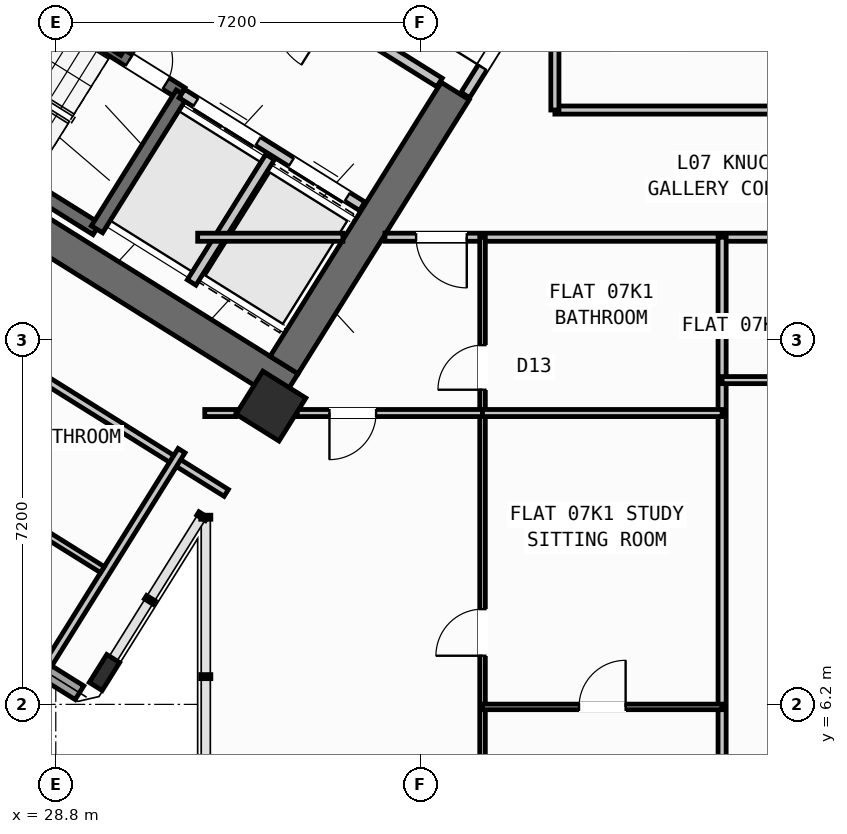
"""IFC4 building model, lengths in metres.
Left out: names, types, materials, properties, quantities, classifications, styles, units other than length and angle.
Written with IfcOpenShell. Run it as: python <this file> out.ifc"""

import sys

from ifc_helpers import new_model, si_unit, direction, frame, frame_2d, origin, origin_2d, place, context, subcontext, project, spatial, rectangle, hollow_rectangle, i_section, extrude, source, transform, mapped, element, fill, save


model = new_model("IFC4")
c1 = context("Model", 3, precision=1e-05, world=origin(), true_north=direction((0.0, 1.0)))
c2 = subcontext(c1, "Body", "Model", "MODEL_VIEW")
j1 = project(units=[si_unit("LENGTHUNIT", "METRE"), si_unit("PLANEANGLEUNIT", "RADIAN")], contexts=[c1])
p1 = place(None, origin())
s1 = spatial("IfcSite", under=j1, at=p1, CompositionType="ELEMENT")
p2 = place(p1, origin())
s2 = spatial("IfcBuilding", under=s1, at=p2, CompositionType="ELEMENT")
p3 = place(p2, frame((0.0, 0.0, 31.2)))
s3 = spatial("IfcBuildingStorey", under=s2, at=p3, CompositionType="ELEMENT", Elevation=31.2)
p4 = place(p3, frame((33.409, 12.45, 0.0), z_axis=(0.0, 0.0, 1.0), x_axis=(-0.848051132073, 0.529914405721, 0.0)))
e1 = element("IfcWall", 1, at=p4, inside=s3, PredefinedType="SHEAR", context=c2, shape_type="SweptSolid", body=[
    extrude(rectangle(XDim=13.24, YDim=0.65, at=frame_2d((6.62, 0.0))), origin(), (0.0, 0.0, 1.0), 3.35),
])
p5 = place(p3, frame((36.683, 18.304, 0.0), z_axis=(0.0, 0.0, 1.0), x_axis=(-0.529899109053, -0.848060690178, 0.0)))
e2 = element("IfcWall", 2, at=p5, inside=s3, PredefinedType="SHEAR", context=c2, shape_type="SweptSolid", body=[
    extrude(rectangle(XDim=6.375, YDim=0.65, at=frame_2d((3.188, 0.0))), origin(), (0.0, 0.0, 1.0), 3.35),
])
m1 = source(origin(), c2, "Body", "SweptSolid", [
    extrude(hollow_rectangle(XDim=1.0, YDim=1.0, WallThickness=0.04, at=origin_2d()), origin(), (0.0, 0.0, 1.0), 3.6),
])
p6 = place(p3, frame((33.046, 12.087, 0.0), z_axis=(0.0, 0.0, 1.0), x_axis=(-0.848048096156, 0.529919264233, 0.0)))
e3 = element("IfcColumn", 3, at=p6, inside=s3, PredefinedType="COLUMN", context=c2, shape_type="MappedRepresentation", body=[
    mapped(m1, transform((0.0, 0.0, 0.0), scale=1.0)),
])
m2 = source(origin(), c2, "Body", "SweptSolid", [
    extrude(i_section(OverallWidth=0.3, OverallDepth=0.65, WebThickness=0.016, FlangeThickness=0.031, at=origin_2d()), origin(), (0.0, 0.0, 1.0), 3.6),
])
p7 = place(p3, frame((29.761, 6.829, 0.0), z_axis=(0.0, 0.0, 1.0), x_axis=(-0.848048096156, 0.529919264233, 0.0)))
e4 = element("IfcColumn", 4, at=p7, inside=s3, PredefinedType="COLUMN", context=c2, shape_type="MappedRepresentation", body=[
    mapped(m2, transform((0.0, 0.0, 0.0), scale=1.0)),
])
p8 = place(p3, frame((29.268, 6.429, 0.0), z_axis=(0.0, 0.0, 1.0), x_axis=(-0.848049971435, 0.529916263149, 0.0)))
e5 = element("IfcWall", 5, at=p8, inside=s3, PredefinedType="STANDARD", context=c2, shape_type="SweptSolid", body=[
    extrude(rectangle(XDim=31.588, YDim=0.32, at=frame_2d((15.794, 0.0))), origin(), (0.0, 0.0, 1.0), 3.35),
])
p9 = place(p8, frame((16.362, 0.0, 0.0)))
e6 = element("IfcOpeningElement", 6, at=p9, cuts=e5, PredefinedType="OPENING", context=c2, shape_type="SweptSolid", body=[
    extrude(rectangle(XDim=1.2, YDim=2.15, at=frame_2d((0.6, 1.075))), frame((0.0, 0.17, 0.0), z_axis=(0.0, -1.0, 0.0), x_axis=(1.0, 0.0, 0.0)), (0.0, 0.0, 1.0), 0.34),
])
p10 = place(p8, frame((2.989, 0.0, 0.8)))
e7 = element("IfcOpeningElement", 7, at=p10, cuts=e5, PredefinedType="OPENING", context=c2, shape_type="SweptSolid", body=[
    extrude(rectangle(XDim=2.1, YDim=1.55, at=frame_2d((1.05, 0.775))), frame((0.0, 0.17, 0.0), z_axis=(0.0, -1.0, 0.0), x_axis=(1.0, 0.0, 0.0)), (0.0, 0.0, 1.0), 0.34),
])
p11 = place(p8, frame((8.359, 0.0, 0.8)))
e8 = element("IfcOpeningElement", 8, at=p11, cuts=e5, PredefinedType="OPENING", context=c2, shape_type="SweptSolid", body=[
    extrude(rectangle(XDim=2.1, YDim=1.55, at=frame_2d((1.05, 0.775))), frame((0.0, 0.17, 0.0), z_axis=(0.0, -1.0, 0.0), x_axis=(1.0, 0.0, 0.0)), (0.0, 0.0, 1.0), 0.34),
])
p12 = place(p8, frame((13.284, 0.0, 0.95)))
e9 = element("IfcOpeningElement", 9, at=p12, cuts=e5, PredefinedType="OPENING", context=c2, shape_type="SweptSolid", body=[
    extrude(rectangle(XDim=1.2, YDim=1.4, at=frame_2d((0.6, 0.7))), frame((0.0, 0.17, 0.0), z_axis=(0.0, -1.0, 0.0), x_axis=(1.0, 0.0, 0.0)), (0.0, 0.0, 1.0), 0.34),
])
p13 = place(p8, frame((29.188, 0.0, 0.95)))
e10 = element("IfcOpeningElement", 10, at=p13, cuts=e5, PredefinedType="OPENING", context=c2, shape_type="SweptSolid", body=[
    extrude(rectangle(XDim=1.2, YDim=1.4, at=frame_2d((0.6, 0.7))), frame((0.0, 0.17, 0.0), z_axis=(0.0, -1.0, 0.0), x_axis=(1.0, 0.0, 0.0)), (0.0, 0.0, 1.0), 0.34),
])
p14 = place(p8, frame((19.11, 0.0, 1.0)))
e11 = element("IfcOpeningElement", 11, at=p14, cuts=e5, PredefinedType="OPENING", context=c2, shape_type="SweptSolid", body=[
    extrude(rectangle(XDim=0.9, YDim=1.25, at=frame_2d((0.45, 0.625))), frame((0.0, 0.17, 0.0), z_axis=(0.0, -1.0, 0.0), x_axis=(1.0, 0.0, 0.0)), (0.0, 0.0, 1.0), 0.34),
])
p15 = place(p8, frame((21.226, 0.0, 1.0)))
e12 = element("IfcOpeningElement", 12, at=p15, cuts=e5, PredefinedType="OPENING", context=c2, shape_type="SweptSolid", body=[
    extrude(rectangle(XDim=0.9, YDim=1.25, at=frame_2d((0.45, 0.625))), frame((0.0, 0.17, 0.0), z_axis=(0.0, -1.0, 0.0), x_axis=(1.0, 0.0, 0.0)), (0.0, 0.0, 1.0), 0.34),
])
p16 = place(p8, frame((23.014, 0.0, 1.0)))
e13 = element("IfcOpeningElement", 13, at=p16, cuts=e5, PredefinedType="OPENING", context=c2, shape_type="SweptSolid", body=[
    extrude(rectangle(XDim=0.9, YDim=1.25, at=frame_2d((0.45, 0.625))), frame((0.0, 0.17, 0.0), z_axis=(0.0, -1.0, 0.0), x_axis=(1.0, 0.0, 0.0)), (0.0, 0.0, 1.0), 0.34),
])
p17 = place(p8, frame((24.802, 0.0, 1.0)))
e14 = element("IfcOpeningElement", 14, at=p17, cuts=e5, PredefinedType="OPENING", context=c2, shape_type="SweptSolid", body=[
    extrude(rectangle(XDim=0.9, YDim=1.25, at=frame_2d((0.45, 0.625))), frame((0.0, 0.17, 0.0), z_axis=(0.0, -1.0, 0.0), x_axis=(1.0, 0.0, 0.0)), (0.0, 0.0, 1.0), 0.34),
])
p18 = place(p8, frame((26.59, 0.0, 1.0)))
e15 = element("IfcOpeningElement", 15, at=p18, cuts=e5, PredefinedType="OPENING", context=c2, shape_type="SweptSolid", body=[
    extrude(rectangle(XDim=0.9, YDim=1.25, at=frame_2d((0.45, 0.625))), frame((0.0, 0.17, 0.0), z_axis=(0.0, -1.0, 0.0), x_axis=(1.0, 0.0, 0.0)), (0.0, 0.0, 1.0), 0.34),
])
p19 = place(p3, frame((29.605, 15.581, 0.0), z_axis=(0.0, 0.0, 1.0), x_axis=(-0.848036911448, 0.529937163087, 0.0)))
e16 = element("IfcWall", 16, at=p19, inside=s3, PredefinedType="SHEAR", context=c2, shape_type="SweptSolid", body=[
    extrude(rectangle(XDim=7.46, YDim=0.26, at=frame_2d((3.73, 0.0))), origin(), (0.0, 0.0, 1.0), 3.35),
])
p20 = place(p3, frame((31.28, 18.261, 0.0), z_axis=(0.0, 0.0, 1.0), x_axis=(-0.848051618787, 0.529913626805, 0.0)))
e17 = element("IfcWall", 17, at=p20, inside=s3, PredefinedType="SHEAR", context=c2, shape_type="SweptSolid", body=[
    extrude(rectangle(XDim=7.46, YDim=0.26, at=frame_2d((3.73, 0.0))), origin(), (0.0, 0.0, 1.0), 3.35),
])
p21 = place(p20, frame((0.36, 0.0, 0.0)))
e18 = element("IfcOpeningElement", 18, at=p21, cuts=e17, PredefinedType="OPENING", context=c2, shape_type="SweptSolid", body=[
    extrude(rectangle(XDim=0.86, YDim=2.05, at=frame_2d((0.43, 1.025))), frame((0.0, 0.14, 0.0), z_axis=(0.0, -1.0, 0.0), x_axis=(1.0, 0.0, 0.0)), (0.0, 0.0, 1.0), 0.28),
])
p22 = place(p3, frame((31.288, 18.256, 0.0), z_axis=(0.0, 0.0, 1.0), x_axis=(-0.529943379326, -0.848033026897, 0.0)))
e19 = element("IfcWall", 19, at=p22, inside=s3, PredefinedType="SHEAR", context=c2, shape_type="SweptSolid", body=[
    extrude(rectangle(XDim=3.16, YDim=0.26, at=frame_2d((1.58, 0.0))), origin(), (0.0, 0.0, 1.0), 3.35),
])
p23 = place(p3, frame((34.848, 16.031, 0.0), z_axis=(0.0, 0.0, 1.0), x_axis=(-0.848044042236, 0.529925751807, 0.0)))
e20 = element("IfcWall", 20, at=p23, inside=s3, PredefinedType="STANDARD", context=c2, shape_type="SweptSolid", body=[
    extrude(rectangle(XDim=4.198, YDim=0.2, at=frame_2d((2.099, 0.0))), origin(), (0.0, 0.0, 1.0), 3.34),
])
p24 = place(p23, frame((0.348, 0.0, 0.0)))
e21 = element("IfcOpeningElement", 21, at=p24, cuts=e20, PredefinedType="OPENING", context=c2, shape_type="SweptSolid", body=[
    extrude(rectangle(XDim=1.3, YDim=2.2, at=frame_2d((0.65, 1.1))), frame((0.0, 0.11, 0.0), z_axis=(0.0, -1.0, 0.0), x_axis=(1.0, 0.0, 0.0)), (0.0, 0.0, 1.0), 0.22),
])
p25 = place(p23, frame((2.423, 0.0, 0.0)))
e22 = element("IfcOpeningElement", 22, at=p25, cuts=e20, PredefinedType="OPENING", context=c2, shape_type="SweptSolid", body=[
    extrude(rectangle(XDim=1.45, YDim=2.25, at=frame_2d((0.725, 1.125))), frame((0.0, 0.11, 0.0), z_axis=(0.0, -1.0, 0.0), x_axis=(1.0, 0.0, 0.0)), (0.0, 0.0, 1.0), 0.22),
])
p26 = place(p3, frame((36.374, 18.474, 0.0), z_axis=(0.0, 0.0, 1.0), x_axis=(-0.848051071577, 0.529914502535, 0.0)))
e23 = element("IfcWall", 23, at=p26, inside=s3, PredefinedType="STANDARD", context=c2, shape_type="SweptSolid", body=[
    extrude(rectangle(XDim=5.718, YDim=0.2, at=frame_2d((2.859, 0.0))), origin(), (0.0, 0.0, 1.0), 3.34),
])
p27 = place(p26, frame((2.498, 0.0, 0.0)))
e24 = element("IfcOpeningElement", 24, at=p27, cuts=e23, PredefinedType="OPENING", context=c2, shape_type="SweptSolid", body=[
    extrude(rectangle(XDim=1.15, YDim=2.1, at=frame_2d((0.575, 1.05))), frame((0.0, 0.11, 0.0), z_axis=(0.0, -1.0, 0.0), x_axis=(1.0, 0.0, 0.0)), (0.0, 0.0, 1.0), 0.22),
])
p28 = place(p3, frame((33.029, 17.003, 0.0), z_axis=(0.0, 0.0, 1.0), x_axis=(-0.529916267533, -0.848049968695, 0.0)))
e25 = element("IfcWall", 25, at=p28, inside=s3, PredefinedType="STANDARD", context=c2, shape_type="SweptSolid", body=[
    extrude(rectangle(XDim=2.92, YDim=0.2, at=frame_2d((1.46, 0.0))), origin(), (0.0, 0.0, 1.0), 3.34),
])
p29 = place(p3, frame((31.525, 21.504, 0.0), z_axis=(0.0, 0.0, 1.0), x_axis=(-0.529907497854, -0.848055448493, 0.0)))
e26 = element("IfcWall", 26, at=p29, inside=s3, PredefinedType="STANDARD", context=c2, shape_type="SweptSolid", body=[
    extrude(rectangle(XDim=2.88, YDim=0.2, at=frame_2d((1.44, 0.0))), origin(), (0.0, 0.0, 1.0), 3.34),
])
p30 = place(p3, frame((32.164, 10.374, 0.0), z_axis=(0.0, 0.0, 1.0), x_axis=(-0.848044107957, 0.529925646633, 0.0)))
e27 = element("IfcWall", 27, at=p30, inside=s3, PredefinedType="PARTITIONING", context=c2, shape_type="SweptSolid", body=[
    extrude(rectangle(XDim=15.57, YDim=0.16, at=frame_2d((7.785, 0.0))), origin(), (0.0, 0.0, 1.0), 3.34),
])
p31 = place(p30, frame((10.83, 0.0, 0.0)))
e28 = element("IfcOpeningElement", 28, at=p31, cuts=e27, PredefinedType="OPENING", context=c2, shape_type="SweptSolid", body=[
    extrude(rectangle(XDim=1.0, YDim=2.1, at=frame_2d((0.5, 1.05))), frame((0.0, 0.09, 0.0), z_axis=(0.0, -1.0, 0.0), x_axis=(1.0, 0.0, 0.0)), (0.0, 0.0, 1.0), 0.18),
])
p32 = place(p3, frame((31.282, 11.208, 0.0), z_axis=(0.0, 0.0, 1.0), x_axis=(-0.529938869374, -0.84803584519, 0.0)))
e29 = element("IfcWall", 29, at=p32, inside=s3, PredefinedType="PARTITIONING", context=c2, shape_type="SweptSolid", body=[
    extrude(rectangle(XDim=5.48, YDim=0.16, at=frame_2d((2.74, 0.0))), origin(), (0.0, 0.0, 1.0), 3.34),
])
p33 = place(p3, frame((29.72, 8.859, 0.0), z_axis=(0.0, 0.0, 1.0), x_axis=(-0.848049134363, 0.529917602752, 0.0)))
e30 = element("IfcWall", 30, at=p33, inside=s3, PredefinedType="PLUMBINGWALL", context=c2, shape_type="SweptSolid", body=[
    extrude(rectangle(XDim=14.3, YDim=0.14, at=frame_2d((7.15, 0.0))), origin(), (0.0, 0.0, 1.0), 3.34),
])
p34 = place(p33, frame((9.57, 0.0, 0.0)))
e31 = element("IfcOpeningElement", 31, at=p34, cuts=e30, PredefinedType="OPENING", context=c2, shape_type="SweptSolid", body=[
    extrude(rectangle(XDim=0.92, YDim=2.08, at=frame_2d((0.46, 1.04))), frame((0.0, 0.08, 0.0), z_axis=(0.0, -1.0, 0.0), x_axis=(1.0, 0.0, 0.0)), (0.0, 0.0, 1.0), 0.16),
])
p35 = place(p3, frame((38.451, 20.737, 0.0), z_axis=(0.0, 0.0, 1.0), x_axis=(-0.529924799939, -0.848044637038, 0.0)))
e32 = element("IfcWall", 32, at=p35, inside=s3, PredefinedType="STANDARD", context=c2, shape_type="SweptSolid", body=[
    extrude(rectangle(XDim=2.96, YDim=0.2, at=frame_2d((1.48, 0.0))), origin(), (0.0, 0.0, 1.0), 3.34),
])
p36 = place(p35, frame((1.46, 0.0, 0.0)))
e33 = element("IfcOpeningElement", 33, at=p36, cuts=e32, PredefinedType="OPENING", context=c2, shape_type="SweptSolid", body=[
    extrude(rectangle(XDim=0.86, YDim=2.05, at=frame_2d((0.43, 1.025))), frame((0.0, 0.11, 0.0), z_axis=(0.0, -1.0, 0.0), x_axis=(1.0, 0.0, 0.0)), (0.0, 0.0, 1.0), 0.22),
])
p37 = place(p3, frame((31.6, 15.42, 0.0), z_axis=(0.0, 0.0, 1.0), x_axis=(1.0, 0.0, 0.0)))
e34 = element("IfcWall", 34, at=p37, inside=s3, PredefinedType="PARTITIONING", context=c2, shape_type="SweptSolid", body=[
    extrude(rectangle(XDim=2.866, YDim=0.16, at=frame_2d((1.433, 0.0))), origin(), (0.0, 0.0, 1.0), 3.34),
])
p38 = place(p3, frame((35.296, 15.42, 0.0), z_axis=(0.0, 0.0, 1.0), x_axis=(1.0, 0.0, 0.0)))
e35 = element("IfcWall", 35, at=p38, inside=s3, PredefinedType="PARTITIONING", context=c2, shape_type="SweptSolid", body=[
    extrude(rectangle(XDim=15.311, YDim=0.16, at=frame_2d((7.655, 0.0))), origin(), (0.0, 0.0, 1.0), 3.34),
])
p39 = place(p38, frame((0.615, 0.0, 0.0)))
e36 = element("IfcOpeningElement", 36, at=p39, cuts=e35, PredefinedType="OPENING", context=c2, shape_type="SweptSolid", body=[
    extrude(rectangle(XDim=1.0, YDim=2.1, at=frame_2d((0.5, 1.05))), frame((0.0, 0.09, 0.0), z_axis=(0.0, -1.0, 0.0), x_axis=(1.0, 0.0, 0.0)), (0.0, 0.0, 1.0), 0.18),
])
p40 = place(p38, frame((9.035, 0.0, 0.0)))
e37 = element("IfcOpeningElement", 37, at=p40, cuts=e35, PredefinedType="OPENING", context=c2, shape_type="SweptSolid", body=[
    extrude(rectangle(XDim=1.0, YDim=2.1, at=frame_2d((0.5, 1.05))), frame((0.0, 0.09, 0.0), z_axis=(0.0, -1.0, 0.0), x_axis=(1.0, 0.0, 0.0)), (0.0, 0.0, 1.0), 0.18),
])
p41 = place(p3, frame((38.65, 17.93, 0.0), z_axis=(0.0, 0.0, 1.0), x_axis=(1.0, 0.0, 0.0)))
e38 = element("IfcWall", 38, at=p41, inside=s3, PredefinedType="PARTITIONING", context=c2, shape_type="SweptSolid", body=[
    extrude(rectangle(XDim=9.95, YDim=0.16, at=frame_2d((4.975, 0.0))), origin(), (0.0, 0.0, 1.0), 3.34),
])
p42 = place(p41, frame((4.475, 0.0, 0.0)))
e39 = element("IfcOpeningElement", 39, at=p42, cuts=e38, PredefinedType="OPENING", context=c2, shape_type="SweptSolid", body=[
    extrude(rectangle(XDim=1.0, YDim=2.1, at=frame_2d((0.5, 1.05))), frame((0.0, 0.09, 0.0), z_axis=(0.0, -1.0, 0.0), x_axis=(1.0, 0.0, 0.0)), (0.0, 0.0, 1.0), 0.18),
])
p43 = place(p3, frame((38.65, 17.93, 0.0), z_axis=(0.0, 0.0, 1.0), x_axis=(0.0, 1.0, 0.0)))
e40 = element("IfcWall", 40, at=p43, inside=s3, PredefinedType="PARTITIONING", context=c2, shape_type="SweptSolid", body=[
    extrude(rectangle(XDim=2.857, YDim=0.16, at=frame_2d((1.428, 0.0))), origin(), (0.0, 0.0, 1.0), 3.34),
])
p44 = place(p3, frame((41.95, 1.96, 0.0), z_axis=(0.0, 0.0, 1.0), x_axis=(0.0, 1.0, 0.0)))
e41 = element("IfcWall", 41, at=p44, inside=s3, PredefinedType="PARTITIONING", context=c2, shape_type="SweptSolid", body=[
    extrude(rectangle(XDim=13.46, YDim=0.16, at=frame_2d((6.73, 0.0))), origin(), (0.0, 0.0, 1.0), 3.34),
])
p45 = place(p3, frame((37.222, 1.96, 0.0), z_axis=(0.0, 0.0, 1.0), x_axis=(0.0, 1.0, 0.0)))
e42 = element("IfcWall", 42, at=p45, inside=s3, PredefinedType="PARTITIONING", context=c2, shape_type="SweptSolid", body=[
    extrude(rectangle(XDim=13.46, YDim=0.11, at=frame_2d((6.73, 0.0))), origin(), (0.0, 0.0, 1.0), 3.34),
])
p46 = place(p45, frame((5.2, 0.0, 0.0)))
e43 = element("IfcOpeningElement", 43, at=p46, cuts=e42, PredefinedType="OPENING", context=c2, shape_type="SweptSolid", body=[
    extrude(rectangle(XDim=0.92, YDim=2.08, at=frame_2d((0.46, 1.04))), frame((0.0, 0.065, 0.0), z_axis=(0.0, -1.0, 0.0), x_axis=(1.0, 0.0, 0.0)), (0.0, 0.0, 1.0), 0.13),
])
p47 = place(p45, frame((10.45, 0.0, 0.0)))
e44 = element("IfcOpeningElement", 44, at=p47, cuts=e42, PredefinedType="OPENING", context=c2, shape_type="SweptSolid", body=[
    extrude(rectangle(XDim=0.88, YDim=2.08, at=frame_2d((0.44, 1.04))), frame((0.0, 0.065, 0.0), z_axis=(0.0, -1.0, 0.0), x_axis=(1.0, 0.0, 0.0)), (0.0, 0.0, 1.0), 0.13),
])
p48 = place(p3, frame((31.74, 11.95, 0.0), z_axis=(0.0, 0.0, 1.0), x_axis=(1.0, 0.0, 0.0)))
e45 = element("IfcWall", 45, at=p48, inside=s3, PredefinedType="PLUMBINGWALL", context=c2, shape_type="SweptSolid", body=[
    extrude(rectangle(XDim=0.617, YDim=0.14, at=frame_2d((0.309, 0.0))), origin(), (0.0, 0.0, 1.0), 3.34),
])
p49 = place(p3, frame((33.564, 11.95, 0.0), z_axis=(0.0, 0.0, 1.0), x_axis=(1.0, 0.0, 0.0)))
e46 = element("IfcWall", 46, at=p49, inside=s3, PredefinedType="PLUMBINGWALL", context=c2, shape_type="SweptSolid", body=[
    extrude(rectangle(XDim=3.657, YDim=0.14, at=frame_2d((1.829, 0.0))), origin(), (0.0, 0.0, 1.0), 2.525),
])
p50 = place(p49, frame((0.637, 0.0, 0.0)))
e47 = element("IfcOpeningElement", 47, at=p50, cuts=e46, PredefinedType="OPENING", context=c2, shape_type="SweptSolid", body=[
    extrude(rectangle(XDim=0.92, YDim=2.08, at=frame_2d((0.46, 1.04))), frame((0.0, 0.08, 0.0), z_axis=(0.0, -1.0, 0.0), x_axis=(1.0, 0.0, 0.0)), (0.0, 0.0, 1.0), 0.16),
])
p51 = place(p3, frame((37.222, 11.95, 0.0), z_axis=(0.0, 0.0, 1.0), x_axis=(1.0, 0.0, 0.0)))
e48 = element("IfcWall", 48, at=p51, inside=s3, PredefinedType="PLUMBINGWALL", context=c2, shape_type="SweptSolid", body=[
    extrude(rectangle(XDim=4.728, YDim=0.14, at=frame_2d((2.364, 0.0))), origin(), (0.0, 0.0, 1.0), 2.525),
])
p52 = place(p3, frame((37.222, 6.15, 0.0), z_axis=(0.0, 0.0, 1.0), x_axis=(1.0, 0.0, 0.0)))
e49 = element("IfcWall", 49, at=p52, inside=s3, PredefinedType="PARTITIONING", context=c2, shape_type="SweptSolid", body=[
    extrude(rectangle(XDim=4.728, YDim=0.11, at=frame_2d((2.364, 0.0))), origin(), (0.0, 0.0, 1.0), 3.34),
])
p53 = place(p52, frame((1.904, 0.0, 0.0)))
e50 = element("IfcOpeningElement", 50, at=p53, cuts=e49, PredefinedType="OPENING", context=c2, shape_type="SweptSolid", body=[
    extrude(rectangle(XDim=0.92, YDim=2.08, at=frame_2d((0.46, 1.04))), frame((0.0, 0.065, 0.0), z_axis=(0.0, -1.0, 0.0), x_axis=(1.0, 0.0, 0.0)), (0.0, 0.0, 1.0), 0.13),
])
p54 = place(p3, frame((41.95, 12.6, 0.0), z_axis=(0.0, 0.0, 1.0), x_axis=(1.0, 0.0, 0.0)))
e51 = element("IfcWall", 51, at=p54, inside=s3, PredefinedType="PLUMBINGWALL", context=c2, shape_type="SweptSolid", body=[
    extrude(rectangle(XDim=5.713, YDim=0.14, at=frame_2d((2.856, 0.0))), origin(), (0.0, 0.0, 1.0), 2.525),
])
p55 = place(p54, frame((2.396, 0.0, 0.0)))
e52 = element("IfcOpeningElement", 52, at=p55, cuts=e51, PredefinedType="OPENING", context=c2, shape_type="SweptSolid", body=[
    extrude(rectangle(XDim=0.92, YDim=2.08, at=frame_2d((0.46, 1.04))), frame((0.0, 0.08, 0.0), z_axis=(0.0, -1.0, 0.0), x_axis=(1.0, 0.0, 0.0)), (0.0, 0.0, 1.0), 0.16),
])
m3 = source(origin(), c2, "Body", "SweptSolid", [
    extrude(rectangle(XDim=0.86, YDim=2.05, at=frame_2d((0.43, 1.025))), frame((0.0, 0.025, 0.0), z_axis=(0.0, -1.0, 0.0), x_axis=(1.0, 0.0, 0.0)), (0.0, 0.0, 1.0), 0.05),
])
p56 = place(p21, frame((0.86, 0.0, 0.0), z_axis=(0.0, 0.0, 1.0), x_axis=(-1.0, 0.0, 0.0)))
e53 = element("IfcDoor", 53, at=p56, inside=s3, OperationType="SINGLE_SWING_LEFT", PredefinedType="DOOR", context=c2, shape_type="MappedRepresentation", body=[
    mapped(m3, transform((0.0, 0.0, 0.0), scale=1.0)),
])
fill(e18, e53)
m4 = source(origin(), c2, "Body", "SweptSolid", [
    extrude(rectangle(XDim=1.3, YDim=2.2, at=frame_2d((0.65, 1.1))), frame((0.0, 0.025, 0.0), z_axis=(0.0, -1.0, 0.0), x_axis=(1.0, 0.0, 0.0)), (0.0, 0.0, 1.0), 0.05),
])
p57 = place(p24, origin())
e54 = element("IfcDoor", 54, at=p57, inside=s3, OperationType="DOUBLE_DOOR_SLIDING", PredefinedType="DOOR", context=c2, shape_type="MappedRepresentation", body=[
    mapped(m4, transform((0.0, 0.0, 0.0), scale=1.0)),
])
fill(e21, e54)
m5 = source(origin(), c2, "Body", "SweptSolid", [
    extrude(rectangle(XDim=1.45, YDim=2.25, at=frame_2d((0.725, 1.125))), frame((0.0, 0.025, 0.0), z_axis=(0.0, -1.0, 0.0), x_axis=(1.0, 0.0, 0.0)), (0.0, 0.0, 1.0), 0.05),
])
p58 = place(p25, origin())
e55 = element("IfcDoor", 55, at=p58, inside=s3, OperationType="DOUBLE_DOOR_SLIDING", PredefinedType="DOOR", context=c2, shape_type="MappedRepresentation", body=[
    mapped(m5, transform((0.0, 0.0, 0.0), scale=1.0)),
])
fill(e22, e55)
p59 = place(p36, frame((0.86, 0.0, 0.0), z_axis=(0.0, 0.0, 1.0), x_axis=(-1.0, 0.0, 0.0)))
e56 = element("IfcDoor", 56, at=p59, inside=s3, OperationType="SINGLE_SWING_LEFT", PredefinedType="DOOR", context=c2, shape_type="MappedRepresentation", body=[
    mapped(m3, transform((0.0, 0.0, 0.0), scale=1.0)),
])
fill(e33, e56)
m6 = source(origin(), c2, "Body", "SweptSolid", [
    extrude(rectangle(XDim=0.92, YDim=2.08, at=frame_2d((0.46, 1.04))), frame((0.0, 0.025, 0.0), z_axis=(0.0, -1.0, 0.0), x_axis=(1.0, 0.0, 0.0)), (0.0, 0.0, 1.0), 0.05),
])
p60 = place(p46, origin())
e57 = element("IfcDoor", 57, at=p60, inside=s3, OperationType="SINGLE_SWING_LEFT", PredefinedType="DOOR", context=c2, shape_type="MappedRepresentation", body=[
    mapped(m6, transform((0.0, 0.0, 0.0), scale=1.0)),
])
fill(e43, e57)
p61 = place(p53, origin())
e58 = element("IfcDoor", 58, at=p61, inside=s3, OperationType="SINGLE_SWING_RIGHT", PredefinedType="DOOR", context=c2, shape_type="MappedRepresentation", body=[
    mapped(m6, transform((0.0, 0.0, 0.0), scale=1.0)),
])
fill(e50, e58)
m7 = source(origin(), c2, "Body", "SweptSolid", [
    extrude(rectangle(XDim=1.0, YDim=2.1, at=frame_2d((0.5, 1.05))), frame((0.0, 0.025, 0.0), z_axis=(0.0, -1.0, 0.0), x_axis=(1.0, 0.0, 0.0)), (0.0, 0.0, 1.0), 0.05),
])
p62 = place(p39, frame((1.0, 0.0, 0.0), z_axis=(0.0, 0.0, 1.0), x_axis=(-1.0, 0.0, 0.0)))
e59 = element("IfcDoor", 59, at=p62, inside=s3, OperationType="SINGLE_SWING_LEFT", PredefinedType="DOOR", context=c2, shape_type="MappedRepresentation", body=[
    mapped(m7, transform((0.0, 0.0, 0.0), scale=1.0)),
])
fill(e36, e59)
p63 = place(p50, frame((0.92, 0.0, 0.0), z_axis=(0.0, 0.0, 1.0), x_axis=(-1.0, 0.0, 0.0)))
e60 = element("IfcDoor", 60, at=p63, inside=s3, OperationType="SINGLE_SWING_RIGHT", PredefinedType="DOOR", context=c2, shape_type="MappedRepresentation", body=[
    mapped(m6, transform((0.0, 0.0, 0.0), scale=1.0)),
])
fill(e47, e60)
m8 = source(origin(), c2, "Body", "SweptSolid", [
    extrude(rectangle(XDim=0.88, YDim=2.08, at=frame_2d((0.44, 1.04))), frame((0.0, 0.025, 0.0), z_axis=(0.0, -1.0, 0.0), x_axis=(1.0, 0.0, 0.0)), (0.0, 0.0, 1.0), 0.05),
])
p64 = place(p47, origin())
e61 = element("IfcDoor", 61, at=p64, inside=s3, OperationType="SINGLE_SWING_LEFT", PredefinedType="DOOR", context=c2, shape_type="MappedRepresentation", body=[
    mapped(m8, transform((0.0, 0.0, 0.0), scale=1.0)),
])
fill(e44, e61)
save(model, sys.argv[1])
